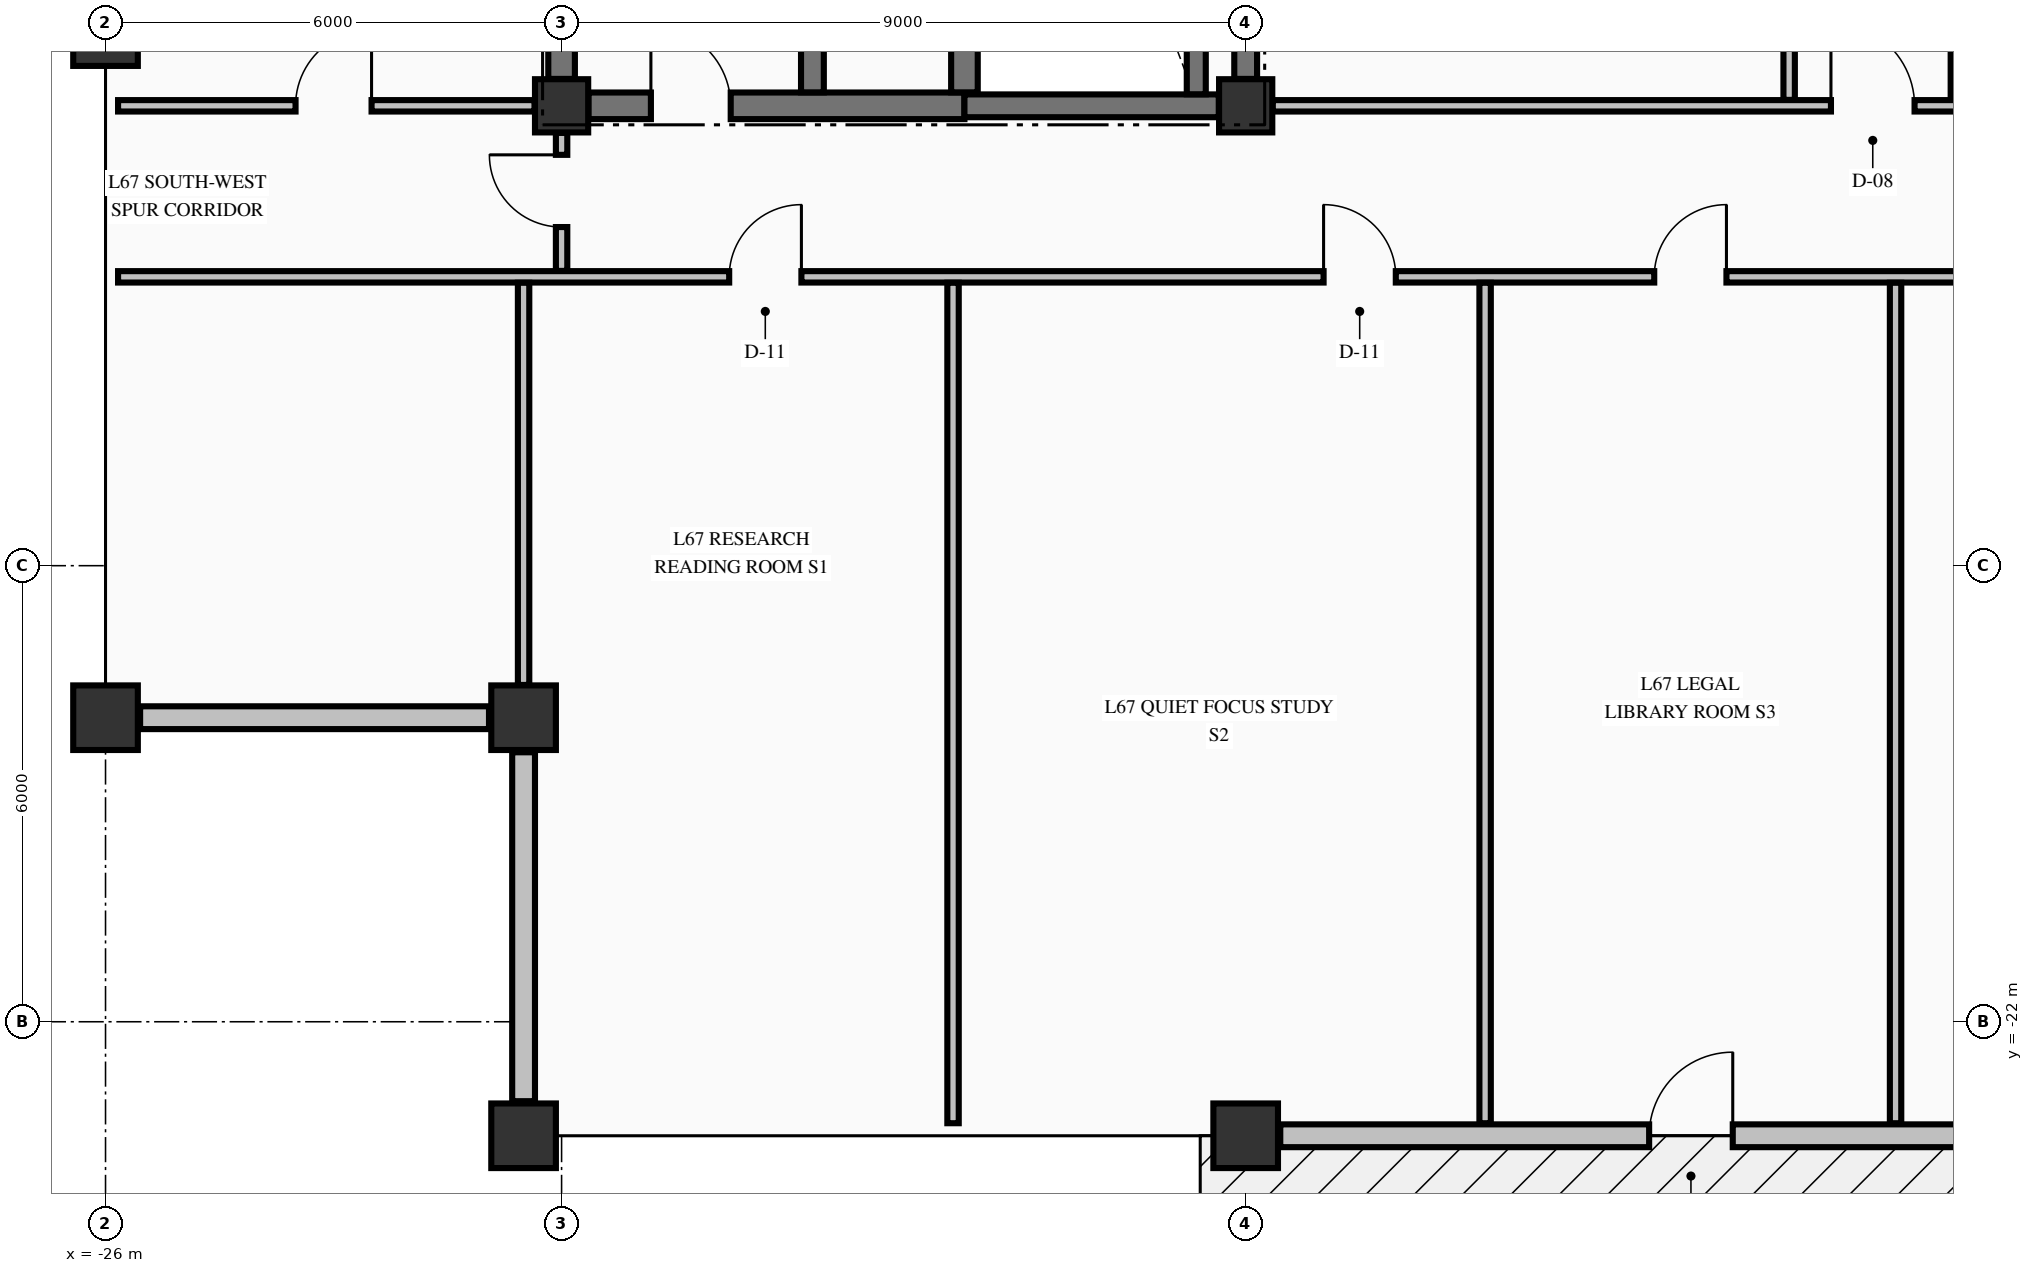
"""IFC4 building model, lengths in metres.
Left out: names, types, materials, properties, quantities, classifications, styles, units other than length and angle.
Written with IfcOpenShell. Run it as: python <this file> out.ifc"""

import sys

from ifc_helpers import new_model, si_unit, direction, frame, frame_2d, origin, origin_2d, place, context, subcontext, project, spatial, rectangle, extrude, element, fill, save


model = new_model("IFC4")
c1 = context("Model", 3, precision=1e-05, world=origin(), true_north=direction((0.0, 1.0)))
c2 = subcontext(c1, "Body", "Model", "MODEL_VIEW")
j1 = project(units=[si_unit("LENGTHUNIT", "METRE"), si_unit("PLANEANGLEUNIT", "RADIAN")], contexts=[c1])
p1 = place(None, origin())
s1 = spatial("IfcSite", under=j1, at=p1, CompositionType="ELEMENT")
p2 = place(p1, origin())
s2 = spatial("IfcBuilding", under=s1, at=p2, CompositionType="ELEMENT")
p3 = place(p2, frame((0.0, 0.0, 254.43)))
s3 = spatial("IfcBuildingStorey", under=s2, at=p3, CompositionType="ELEMENT", Elevation=254.43)
for number, where, z_axis, x_axis in (
    (1, (-20.5, -23.5, -0.425), (0.0, 0.0, 1.0), (1.0, 0.0, 0.0)),
    (2, (-11.0, -23.5, -0.425), (0.0, 0.0, 1.0), (1.0, 0.0, 0.0)),
    (3, (-26.0, -18.0, -0.425), (0.0, 0.0, 1.0), (1.0, 0.0, 0.0)),
    (4, (-26.0, -9.0, -0.425), (0.0, 0.0, 1.0), (1.0, 0.0, 0.0)),
    (5, (-20.5, -18.0, -0.425), (0.0, 0.0, 1.0), (1.0, 0.0, 0.0)),
):
    element("IfcColumn", number, at=place(p3, frame(where, z_axis=z_axis, x_axis=x_axis)), inside=s3, PredefinedType="COLUMN", context=c2, shape_type="SweptSolid", body=[
        extrude(rectangle(XDim=0.85, YDim=0.85, at=origin_2d()), origin(), (0.0, 0.0, 1.0), 3.405),
    ])
for number, where, z_axis, x_axis in (
    (6, (-20.0, -9.95, -0.425), (0.0, 0.0, 1.0), (1.0, 0.0, 0.0)),
    (7, (-11.0, -9.95, -0.425), (0.0, 0.0, 1.0), (1.0, 0.0, 0.0)),
):
    element("IfcColumn", number, at=place(p3, frame(where, z_axis=z_axis, x_axis=x_axis)), inside=s3, PredefinedType="COLUMN", context=c2, shape_type="SweptSolid", body=[
        extrude(rectangle(XDim=0.7, YDim=0.7, at=origin_2d()), origin(), (0.0, 0.0, 1.0), 3.405),
    ])
for number, where, z_axis, x_axis in (
    (8, (-25.545, -18.0, 0.0), (0.0, 0.0, 1.0), (1.0, 0.0, 0.0)),
    (9, (-20.5, -18.455, 0.0), (0.0, 0.0, 1.0), (0.0, -1.0, 0.0)),
):
    element("IfcWall", number, at=place(p3, frame(where, z_axis=z_axis, x_axis=x_axis)), inside=s3, PredefinedType="STANDARD", context=c2, shape_type="SweptSolid", body=[
        extrude(rectangle(XDim=4.59, YDim=0.3, at=frame_2d((2.295, 0.0))), origin(), (0.0, 0.0, 1.0), 1.172),
    ])
p4 = place(p3, frame((-10.545, -23.5, 0.0), z_axis=(0.0, 0.0, 1.0), x_axis=(1.0, 0.0, 0.0)))
e10 = element("IfcWall", 10, at=p4, inside=s3, PredefinedType="STANDARD", context=c2, shape_type="SweptSolid", body=[
    extrude(rectangle(XDim=10.09, YDim=0.3, at=frame_2d((5.045, 0.0))), origin(), (0.0, 0.0, 1.0), 2.372),
])
p5 = place(p4, frame((4.853, 0.0, 0.0)))
e11 = element("IfcOpeningElement", 11, at=p5, cuts=e10, PredefinedType="OPENING", context=c2, shape_type="SweptSolid", body=[
    extrude(rectangle(XDim=1.1, YDim=2.15, at=frame_2d((0.55, 1.075))), frame((0.0, 0.16, 0.0), z_axis=(0.0, -1.0, 0.0), x_axis=(1.0, 0.0, 0.0)), (0.0, 0.0, 1.0), 0.32),
])
p6 = place(p3, frame((-19.646, -9.95, 0.0), z_axis=(0.0, 0.0, 1.0), x_axis=(1.0, 0.0, 0.0)))
e12 = element("IfcWall", 12, at=p6, inside=s3, PredefinedType="SHEAR", context=c2, shape_type="SweptSolid", body=[
    extrude(rectangle(XDim=4.946, YDim=0.35, at=frame_2d((2.473, 0.0))), origin(), (0.0, 0.0, 1.0), 2.98),
])
p7 = place(p6, frame((0.821, 0.0, 0.0)))
e13 = element("IfcOpeningElement", 13, at=p7, cuts=e12, PredefinedType="OPENING", context=c2, shape_type="SweptSolid", body=[
    extrude(rectangle(XDim=1.05, YDim=2.15, at=frame_2d((0.525, 1.075))), frame((0.0, 0.185, 0.0), z_axis=(0.0, -1.0, 0.0), x_axis=(1.0, 0.0, 0.0)), (0.0, 0.0, 1.0), 0.37),
])
p8 = place(p3, frame((-14.7, -9.95, 0.0), z_axis=(0.0, 0.0, 1.0), x_axis=(1.0, 0.0, 0.0)))
e14 = element("IfcWall", 14, at=p8, inside=s3, PredefinedType="SHEAR", context=c2, shape_type="SweptSolid", body=[
    extrude(rectangle(XDim=3.346, YDim=0.3, at=frame_2d((1.673, 0.0))), origin(), (0.0, 0.0, 1.0), 2.98),
])
p9 = place(p3, frame((-25.835, -12.2, 0.0), z_axis=(0.0, 0.0, 1.0), x_axis=(1.0, 0.0, 0.0)))
e15 = element("IfcWall", 15, at=p9, inside=s3, PredefinedType="PARTITIONING", context=c2, shape_type="SweptSolid", body=[
    extrude(rectangle(XDim=45.91, YDim=0.15, at=frame_2d((22.955, 0.0))), origin(), (0.0, 0.0, 1.0), 2.98),
])
p10 = place(p9, frame((8.04, 0.0, 0.0)))
e16 = element("IfcOpeningElement", 16, at=p10, cuts=e15, PredefinedType="OPENING", context=c2, shape_type="SweptSolid", body=[
    extrude(rectangle(XDim=0.95, YDim=2.15, at=frame_2d((0.475, 1.075))), frame((0.0, 0.085, 0.0), z_axis=(0.0, -1.0, 0.0), x_axis=(1.0, 0.0, 0.0)), (0.0, 0.0, 1.0), 0.17),
])
p11 = place(p9, frame((15.86, 0.0, 0.0)))
e17 = element("IfcOpeningElement", 17, at=p11, cuts=e15, PredefinedType="OPENING", context=c2, shape_type="SweptSolid", body=[
    extrude(rectangle(XDim=0.95, YDim=2.15, at=frame_2d((0.475, 1.075))), frame((0.0, 0.085, 0.0), z_axis=(0.0, -1.0, 0.0), x_axis=(1.0, 0.0, 0.0)), (0.0, 0.0, 1.0), 0.17),
])
p12 = place(p9, frame((20.21, 0.0, 0.0)))
e18 = element("IfcOpeningElement", 18, at=p12, cuts=e15, PredefinedType="OPENING", context=c2, shape_type="SweptSolid", body=[
    extrude(rectangle(XDim=0.95, YDim=2.15, at=frame_2d((0.475, 1.075))), frame((0.0, 0.085, 0.0), z_axis=(0.0, -1.0, 0.0), x_axis=(1.0, 0.0, 0.0)), (0.0, 0.0, 1.0), 0.17),
])
p13 = place(p9, frame((24.56, 0.0, 0.0)))
e19 = element("IfcOpeningElement", 19, at=p13, cuts=e15, PredefinedType="OPENING", context=c2, shape_type="SweptSolid", body=[
    extrude(rectangle(XDim=0.95, YDim=2.15, at=frame_2d((0.475, 1.075))), frame((0.0, 0.085, 0.0), z_axis=(0.0, -1.0, 0.0), x_axis=(1.0, 0.0, 0.0)), (0.0, 0.0, 1.0), 0.17),
])
p14 = place(p9, frame((39.16, 0.0, 0.0)))
e20 = element("IfcOpeningElement", 20, at=p14, cuts=e15, PredefinedType="OPENING", context=c2, shape_type="SweptSolid", body=[
    extrude(rectangle(XDim=1.05, YDim=2.15, at=frame_2d((0.525, 1.075))), frame((0.0, 0.085, 0.0), z_axis=(0.0, -1.0, 0.0), x_axis=(1.0, 0.0, 0.0)), (0.0, 0.0, 1.0), 0.17),
])
p15 = place(p3, frame((-25.835, -9.95, 0.0), z_axis=(0.0, 0.0, 1.0), x_axis=(1.0, 0.0, 0.0)))
e21 = element("IfcWall", 21, at=p15, inside=s3, PredefinedType="PARTITIONING", context=c2, shape_type="SweptSolid", body=[
    extrude(rectangle(XDim=5.479, YDim=0.15, at=frame_2d((2.74, 0.0))), origin(), (0.0, 0.0, 1.0), 2.98),
])
p16 = place(p15, frame((2.335, 0.0, 0.0)))
e22 = element("IfcOpeningElement", 22, at=p16, cuts=e21, PredefinedType="OPENING", context=c2, shape_type="SweptSolid", body=[
    extrude(rectangle(XDim=1.0, YDim=2.15, at=frame_2d((0.5, 1.075))), frame((0.0, 0.085, 0.0), z_axis=(0.0, -1.0, 0.0), x_axis=(1.0, 0.0, 0.0)), (0.0, 0.0, 1.0), 0.17),
])
p17 = place(p3, frame((-10.644, -9.95, 0.0), z_axis=(0.0, 0.0, 1.0), x_axis=(1.0, 0.0, 0.0)))
e23 = element("IfcWall", 23, at=p17, inside=s3, PredefinedType="PARTITIONING", context=c2, shape_type="SweptSolid", body=[
    extrude(rectangle(XDim=21.288, YDim=0.15, at=frame_2d((10.644, 0.0))), origin(), (0.0, 0.0, 1.0), 2.98),
])
p18 = place(p17, frame((7.344, 0.0, 0.0)))
e24 = element("IfcOpeningElement", 24, at=p18, cuts=e23, PredefinedType="OPENING", context=c2, shape_type="SweptSolid", body=[
    extrude(rectangle(XDim=1.1, YDim=2.15, at=frame_2d((0.55, 1.075))), frame((0.0, 0.085, 0.0), z_axis=(0.0, -1.0, 0.0), x_axis=(1.0, 0.0, 0.0)), (0.0, 0.0, 1.0), 0.17),
])
p19 = place(p17, frame((13.769, 0.0, 0.0)))
e25 = element("IfcOpeningElement", 25, at=p19, cuts=e23, PredefinedType="OPENING", context=c2, shape_type="SweptSolid", body=[
    extrude(rectangle(XDim=0.95, YDim=2.15, at=frame_2d((0.475, 1.075))), frame((0.0, 0.085, 0.0), z_axis=(0.0, -1.0, 0.0), x_axis=(1.0, 0.0, 0.0)), (0.0, 0.0, 1.0), 0.17),
])
p20 = place(p17, frame((17.994, 0.0, 0.0)))
e26 = element("IfcOpeningElement", 26, at=p20, cuts=e23, PredefinedType="OPENING", context=c2, shape_type="SweptSolid", body=[
    extrude(rectangle(XDim=0.9, YDim=2.15, at=frame_2d((0.45, 1.075))), frame((0.0, 0.085, 0.0), z_axis=(0.0, -1.0, 0.0), x_axis=(1.0, 0.0, 0.0)), (0.0, 0.0, 1.0), 0.17),
])
p21 = place(p3, frame((-20.0, -9.596, 0.0), z_axis=(0.0, 0.0, 1.0), x_axis=(0.0, 1.0, 0.0)))
e27 = element("IfcWall", 27, at=p21, inside=s3, PredefinedType="SHEAR", context=c2, shape_type="SweptSolid", body=[
    extrude(rectangle(XDim=9.242, YDim=0.35, at=frame_2d((4.621, 0.0))), origin(), (0.0, 0.0, 1.0), 2.98),
])
p22 = place(p3, frame((-16.7, -9.773, 0.0), z_axis=(0.0, 0.0, 1.0), x_axis=(0.0, 1.0, 0.0)))
e28 = element("IfcWall", 28, at=p22, inside=s3, PredefinedType="SHEAR", context=c2, shape_type="SweptSolid", body=[
    extrude(rectangle(XDim=9.371, YDim=0.3, at=frame_2d((4.686, 0.0))), origin(), (0.0, 0.0, 1.0), 2.98),
])
p23 = place(p3, frame((-14.7, -9.773, 0.0), z_axis=(0.0, 0.0, 1.0), x_axis=(0.0, 1.0, 0.0)))
e29 = element("IfcWall", 29, at=p23, inside=s3, PredefinedType="SHEAR", context=c2, shape_type="SweptSolid", body=[
    extrude(rectangle(XDim=9.371, YDim=0.35, at=frame_2d((4.686, 0.0))), origin(), (0.0, 0.0, 1.0), 2.98),
])
p24 = place(p3, frame((-11.65, -9.798, 0.0), z_axis=(0.0, 0.0, 1.0), x_axis=(0.0, 1.0, 0.0)))
e30 = element("IfcWall", 30, at=p24, inside=s3, PredefinedType="SOLIDWALL", context=c2, shape_type="SweptSolid", body=[
    extrude(rectangle(XDim=9.396, YDim=0.25, at=frame_2d((4.698, 0.0))), origin(), (0.0, 0.0, 1.0), 2.98),
])
p25 = place(p3, frame((-11.0, -9.596, 0.0), z_axis=(0.0, 0.0, 1.0), x_axis=(0.0, 1.0, 0.0)))
e31 = element("IfcWall", 31, at=p25, inside=s3, PredefinedType="SHEAR", context=c2, shape_type="SweptSolid", body=[
    extrude(rectangle(XDim=9.242, YDim=0.3, at=frame_2d((4.621, 0.0))), origin(), (0.0, 0.0, 1.0), 2.98),
])
p26 = place(p3, frame((-20.5, -17.569, 0.0), z_axis=(0.0, 0.0, 1.0), x_axis=(0.0, 1.0, 0.0)))
e32 = element("IfcWall", 32, at=p26, inside=s3, PredefinedType="PARTITIONING", context=c2, shape_type="SweptSolid", body=[
    extrude(rectangle(XDim=5.291, YDim=0.15, at=frame_2d((2.646, 0.0))), origin(), (0.0, 0.0, 1.0), 2.98),
])
p27 = place(p3, frame((-20.0, -12.122, 0.0), z_axis=(0.0, 0.0, 1.0), x_axis=(0.0, 1.0, 0.0)))
e33 = element("IfcWall", 33, at=p27, inside=s3, PredefinedType="PARTITIONING", context=c2, shape_type="SweptSolid", body=[
    extrude(rectangle(XDim=1.816, YDim=0.15, at=frame_2d((0.908, 0.0))), origin(), (0.0, 0.0, 1.0), 2.98),
])
p28 = place(p27, frame((0.577, 0.0, 0.0)))
e34 = element("IfcOpeningElement", 34, at=p28, cuts=e33, PredefinedType="OPENING", context=c2, shape_type="SweptSolid", body=[
    extrude(rectangle(XDim=0.95, YDim=2.15, at=frame_2d((0.475, 1.075))), frame((0.0, 0.085, 0.0), z_axis=(0.0, -1.0, 0.0), x_axis=(1.0, 0.0, 0.0)), (0.0, 0.0, 1.0), 0.17),
])
for number, where, z_axis, x_axis in (
    (35, (-14.85, -23.335, 0.0), (0.0, 0.0, 1.0), (0.0, 1.0, 0.0)),
    (36, (-7.85, -23.335, 0.0), (0.0, 0.0, 1.0), (0.0, 1.0, 0.0)),
):
    element("IfcWall", number, at=place(p3, frame(where, z_axis=z_axis, x_axis=x_axis)), inside=s3, PredefinedType="PARTITIONING", context=c2, shape_type="SweptSolid", body=[
        extrude(rectangle(XDim=11.057, YDim=0.15, at=frame_2d((5.528, 0.0))), origin(), (0.0, 0.0, 1.0), 2.98),
    ])
p29 = place(p3, frame((-3.85, -9.872, 0.0), z_axis=(0.0, 0.0, 1.0), x_axis=(0.0, 1.0, 0.0)))
e37 = element("IfcWall", 37, at=p29, inside=s3, PredefinedType="PARTITIONING", context=c2, shape_type="SweptSolid", body=[
    extrude(rectangle(XDim=9.544, YDim=0.15, at=frame_2d((4.772, 0.0))), origin(), (0.0, 0.0, 1.0), 2.98),
])
p30 = place(p3, frame((-2.45, -23.335, 0.0), z_axis=(0.0, 0.0, 1.0), x_axis=(0.0, 1.0, 0.0)))
e38 = element("IfcWall", 38, at=p30, inside=s3, PredefinedType="PARTITIONING", context=c2, shape_type="SweptSolid", body=[
    extrude(rectangle(XDim=11.057, YDim=0.15, at=frame_2d((5.528, 0.0))), origin(), (0.0, 0.0, 1.0), 2.98),
])
p31 = place(p3, frame((-1.65, -9.872, 0.0), z_axis=(0.0, 0.0, 1.0), x_axis=(0.0, 1.0, 0.0)))
e39 = element("IfcWall", 39, at=p31, inside=s3, PredefinedType="PARTITIONING", context=c2, shape_type="SweptSolid", body=[
    extrude(rectangle(XDim=4.419, YDim=0.15, at=frame_2d((2.209, 0.0))), origin(), (0.0, 0.0, 1.0), 2.98),
])
p32 = place(p31, frame((2.597, 0.0, 0.0)))
e40 = element("IfcOpeningElement", 40, at=p32, cuts=e39, PredefinedType="OPENING", context=c2, shape_type="SweptSolid", body=[
    extrude(rectangle(XDim=0.95, YDim=2.15, at=frame_2d((0.475, 1.075))), frame((0.0, 0.085, 0.0), z_axis=(0.0, -1.0, 0.0), x_axis=(1.0, 0.0, 0.0)), (0.0, 0.0, 1.0), 0.17),
])
p33 = place(p5, origin())
e41 = element("IfcDoor", 41, at=p33, inside=s3, OperationType="SINGLE_SWING_RIGHT", PredefinedType="DOOR", context=c2, shape_type="SweptSolid", body=[
    extrude(rectangle(XDim=1.1, YDim=2.15, at=frame_2d((0.55, 1.075))), frame((0.0, 0.025, 0.0), z_axis=(0.0, -1.0, 0.0), x_axis=(1.0, 0.0, 0.0)), (0.0, 0.0, 1.0), 0.05),
])
fill(e11, e41)
p34 = place(p7, origin())
e42 = element("IfcDoor", 42, at=p34, inside=s3, OperationType="SINGLE_SWING_LEFT", PredefinedType="DOOR", context=c2, shape_type="SweptSolid", body=[
    extrude(rectangle(XDim=1.05, YDim=2.15, at=frame_2d((0.525, 1.075))), frame((0.0, 0.025, 0.0), z_axis=(0.0, -1.0, 0.0), x_axis=(1.0, 0.0, 0.0)), (0.0, 0.0, 1.0), 0.05),
])
fill(e13, e42)
p35 = place(p18, origin())
e43 = element("IfcDoor", 43, at=p35, inside=s3, OperationType="SINGLE_SWING_LEFT", PredefinedType="DOOR", context=c2, shape_type="SweptSolid", body=[
    extrude(rectangle(XDim=1.1, YDim=2.15, at=frame_2d((0.55, 1.075))), frame((0.0, 0.025, 0.0), z_axis=(0.0, -1.0, 0.0), x_axis=(1.0, 0.0, 0.0)), (0.0, 0.0, 1.0), 0.05),
])
fill(e24, e43)
p36 = place(p10, origin())
e44 = element("IfcDoor", 44, at=p36, inside=s3, OperationType="SINGLE_SWING_RIGHT", PredefinedType="DOOR", context=c2, shape_type="SweptSolid", body=[
    extrude(rectangle(XDim=0.95, YDim=2.15, at=frame_2d((0.475, 1.075))), frame((0.0, 0.025, 0.0), z_axis=(0.0, -1.0, 0.0), x_axis=(1.0, 0.0, 0.0)), (0.0, 0.0, 1.0), 0.05),
])
fill(e16, e44)
p37 = place(p11, origin())
e45 = element("IfcDoor", 45, at=p37, inside=s3, OperationType="SINGLE_SWING_LEFT", PredefinedType="DOOR", context=c2, shape_type="SweptSolid", body=[
    extrude(rectangle(XDim=0.95, YDim=2.15, at=frame_2d((0.475, 1.075))), frame((0.0, 0.025, 0.0), z_axis=(0.0, -1.0, 0.0), x_axis=(1.0, 0.0, 0.0)), (0.0, 0.0, 1.0), 0.05),
])
fill(e17, e45)
p38 = place(p12, origin())
e46 = element("IfcDoor", 46, at=p38, inside=s3, OperationType="SINGLE_SWING_RIGHT", PredefinedType="DOOR", context=c2, shape_type="SweptSolid", body=[
    extrude(rectangle(XDim=0.95, YDim=2.15, at=frame_2d((0.475, 1.075))), frame((0.0, 0.025, 0.0), z_axis=(0.0, -1.0, 0.0), x_axis=(1.0, 0.0, 0.0)), (0.0, 0.0, 1.0), 0.05),
])
fill(e18, e46)
p39 = place(p28, origin())
e47 = element("IfcDoor", 47, at=p39, inside=s3, OperationType="SINGLE_SWING_RIGHT", PredefinedType="DOOR", context=c2, shape_type="SweptSolid", body=[
    extrude(rectangle(XDim=0.95, YDim=2.15, at=frame_2d((0.475, 1.075))), frame((0.0, 0.025, 0.0), z_axis=(0.0, -1.0, 0.0), x_axis=(1.0, 0.0, 0.0)), (0.0, 0.0, 1.0), 0.05),
])
fill(e34, e47)
p40 = place(p16, origin())
e48 = element("IfcDoor", 48, at=p40, inside=s3, OperationType="SINGLE_SWING_RIGHT", PredefinedType="DOOR", context=c2, shape_type="SweptSolid", body=[
    extrude(rectangle(XDim=1.0, YDim=2.15, at=frame_2d((0.5, 1.075))), frame((0.0, 0.025, 0.0), z_axis=(0.0, -1.0, 0.0), x_axis=(1.0, 0.0, 0.0)), (0.0, 0.0, 1.0), 0.05),
])
fill(e22, e48)
save(model, sys.argv[1])
